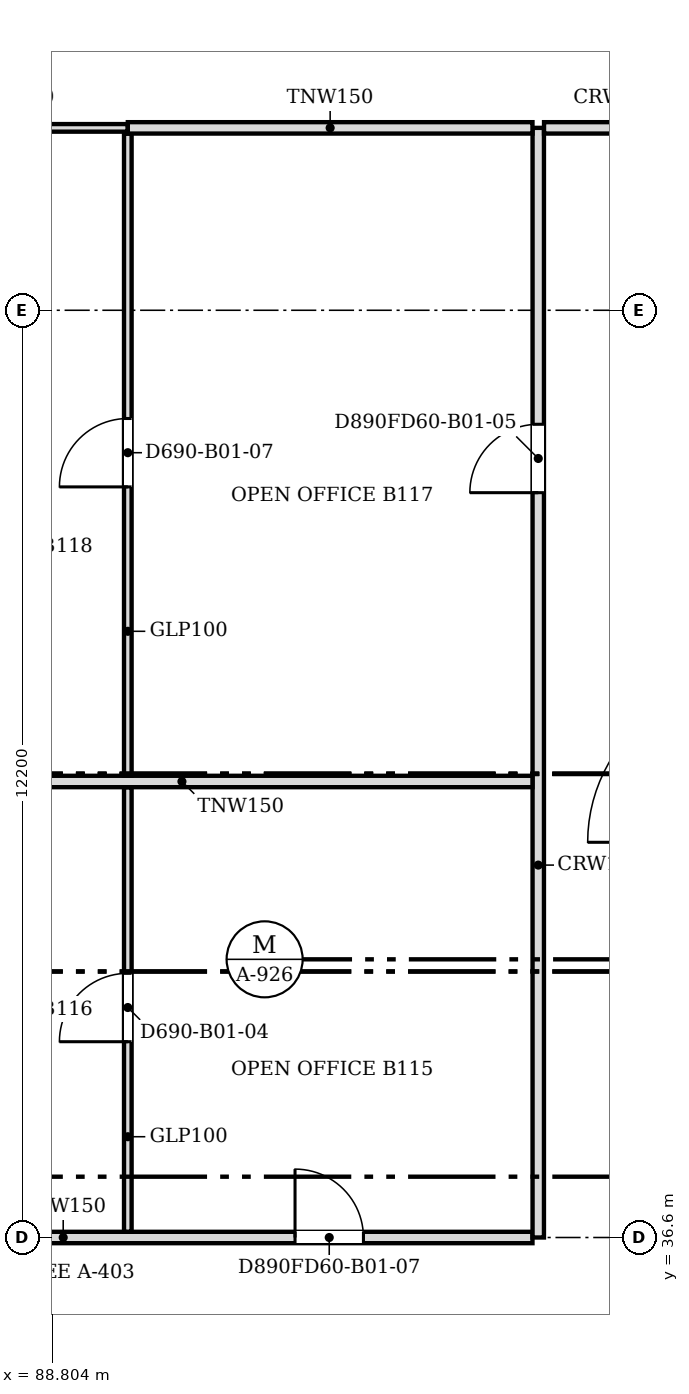
"""IFC4 building model, lengths in metres.
Left out: names, types, materials, properties, quantities, classifications, styles, units other than length and angle.
Written with IfcOpenShell. Run it as: python <this file> out.ifc"""

import sys

from ifc_helpers import new_model, si_unit, direction, frame, frame_2d, origin, place, context, subcontext, project, spatial, polyline, rectangle, outline, extrude, faceted_brep, source, transform, mapped, element, fill, save


model = new_model("IFC4")
c1 = context("Model", 3, precision=1e-05, world=origin(), true_north=direction((0.0, 1.0)))
c2 = subcontext(c1, "Body", "Model", "MODEL_VIEW")
j1 = project(units=[si_unit("LENGTHUNIT", "METRE"), si_unit("PLANEANGLEUNIT", "RADIAN")], contexts=[c1])
p1 = place(None, origin())
s1 = spatial("IfcSite", under=j1, at=p1, CompositionType="ELEMENT")
p2 = place(p1, origin())
s2 = spatial("IfcBuilding", under=s1, at=p2, CompositionType="ELEMENT")
p3 = place(p2, frame((0.0, 0.0, 16.8)))
s3 = spatial("IfcBuildingStorey", under=s2, at=p3, CompositionType="ELEMENT", Elevation=16.8)
m1 = source(origin(), c2, "Body", "Brep", [
    faceted_brep([(2.997, -0.25, 4.419), (2.944, -0.25, 4.5), (0.0, -0.25, 0.0), (2.997, -0.25, 0.0), (0.053, 0.25, 0.081), (2.891, 0.25, 4.419), (2.891, 0.25, 0.0), (0.053, 0.25, 0.0), (2.944, 0.0, 4.5), (0.0, 0.0, 0.0)], [[[0, 1, 2, 3]], [[4, 5, 6, 7]], [[8, 1, 0]], [[5, 4, 9, 2, 1, 8]], [[7, 6, 3, 2, 9]], [[7, 9, 4]], [[3, 6, 5, 8, 0]]]),
])
p4 = place(p3, frame((88.794, 53.588, 0.0), z_axis=(0.0, 0.0, 1.0), x_axis=(-0.707066050402, -0.707147509625, 0.0)))
e1 = element("IfcWall", 1, at=p4, inside=s3, PredefinedType="SOLIDWALL", context=c2, shape_type="MappedRepresentation", body=[
    mapped(m1, transform((0.0, 0.0, 0.0), scale=1.0)),
])
m2 = source(origin(), c2, "Body", "SweptSolid", [
    extrude(outline(polyline([(2.744, 3.738), (0.462, 0.25), (2.744, 0.25), (2.744, 3.738)])), frame((0.0, 0.26, 0.0), z_axis=(0.0, -1.0, 0.0), x_axis=(1.0, 0.0, 0.0)), (0.0, 0.0, 1.0), 0.52),
])
p5 = place(p4, origin())
e2 = element("IfcOpeningElement", 2, at=p5, cuts=e1, PredefinedType="OPENING", context=c2, shape_type="MappedRepresentation", body=[
    mapped(m2, transform((0.0, 0.0, 0.0), scale=1.0)),
])
p6 = place(p2, frame((0.0, 0.0, 21.3)))
s4 = spatial("IfcBuildingStorey", under=s2, at=p6, CompositionType="ELEMENT", Elevation=21.3)
m3 = source(origin(), c2, "Body", "Brep", [
    faceted_brep([(0.053, -0.25, 0.0), (2.997, -0.25, 4.5), (0.053, -0.25, 9.0), (0.0, -0.25, 8.919), (0.0, -0.25, 0.081), (0.106, 0.25, 8.919), (2.944, 0.25, 4.581), (2.944, 0.25, 4.419), (0.106, 0.25, 0.081), (2.997, 0.0, 4.5), (0.053, 0.0, 0.0), (0.053, 0.0, 9.0)], [[[0, 1, 2, 3, 4]], [[5, 6, 7, 8]], [[8, 7, 9, 1, 0, 10]], [[6, 5, 11, 2, 1, 9]], [[3, 2, 11]], [[10, 0, 4]], [[8, 10, 4, 3, 11, 5]], [[9, 7, 6]]]),
])
p7 = place(p6, frame((88.831, 53.625, -4.5), z_axis=(0.0, 0.0, 1.0), x_axis=(-0.707147509625, -0.707066050402, 0.0)))
e3 = element("IfcWall", 3, at=p7, inside=s4, PredefinedType="SOLIDWALL", context=c2, shape_type="MappedRepresentation", body=[
    mapped(m3, transform((0.0, 0.0, 0.0), scale=1.0)),
])
m4 = source(origin(), c2, "Body", "SweptSolid", [
    extrude(outline(polyline([(0.253, 0.762), (2.698, 4.5), (0.253, 8.238), (0.253, 0.762)])), frame((0.0, 0.26, 0.0), z_axis=(0.0, -1.0, 0.0), x_axis=(1.0, 0.0, 0.0)), (0.0, 0.0, 1.0), 0.52),
])
p8 = place(p7, origin())
e4 = element("IfcOpeningElement", 4, at=p8, cuts=e3, PredefinedType="OPENING", context=c2, shape_type="MappedRepresentation", body=[
    mapped(m4, transform((0.0, 0.0, 0.0), scale=1.0)),
])
p9 = place(p3, frame((85.9, 36.6, 0.0), z_axis=(0.0, 0.0, 1.0), x_axis=(1.0, 0.0, 0.0)))
e5 = element("IfcWall", 5, at=p9, inside=s3, PredefinedType="PARTITIONING", context=c2, shape_type="SweptSolid", body=[
    extrude(rectangle(XDim=9.224, YDim=0.15, at=frame_2d((4.612, 0.0))), origin(), (0.0, 0.0, 1.0), 3.415),
])
m5 = source(origin(), c2, "Body", "SweptSolid", [
    extrude(rectangle(XDim=0.9, YDim=2.1, at=frame_2d((0.45, 1.05))), frame((0.0, 0.085, 0.0), z_axis=(0.0, -1.0, 0.0), x_axis=(1.0, 0.0, 0.0)), (0.0, 0.0, 1.0), 0.17),
])
p10 = place(p9, frame((6.1, 0.0, 0.0)))
e6 = element("IfcOpeningElement", 6, at=p10, cuts=e5, PredefinedType="OPENING", context=c2, shape_type="MappedRepresentation", body=[
    mapped(m5, transform((0.0, 0.0, 0.0), scale=1.0)),
])
p11 = place(p3, frame((95.2, 36.6, 0.0), z_axis=(0.0, 0.0, 1.0), x_axis=(0.0, 1.0, 0.0)))
e7 = element("IfcWall", 7, at=p11, inside=s3, PredefinedType="PARTITIONING", context=c2, shape_type="SweptSolid", body=[
    extrude(rectangle(XDim=14.6, YDim=0.15, at=frame_2d((7.3, 0.0))), origin(), (0.0, 0.0, 1.0), 3.415),
])
p12 = place(p11, frame((9.8, 0.0, 0.0)))
e8 = element("IfcOpeningElement", 8, at=p12, cuts=e7, PredefinedType="OPENING", context=c2, shape_type="MappedRepresentation", body=[
    mapped(m5, transform((0.0, 0.0, 0.0), scale=1.0)),
])
p13 = place(p3, frame((89.8, 36.676, 0.0), z_axis=(0.0, 0.0, 1.0), x_axis=(0.0, 1.0, 0.0)))
e9 = element("IfcWall", 9, at=p13, inside=s3, PredefinedType="PARTITIONING", context=c2, shape_type="SweptSolid", body=[
    extrude(rectangle(XDim=5.848, YDim=0.1, at=frame_2d((2.924, 0.0))), origin(), (0.0, 0.0, 1.0), 3.415),
])
m6 = source(origin(), c2, "Body", "SweptSolid", [
    extrude(rectangle(XDim=0.9, YDim=2.1, at=frame_2d((0.45, 1.05))), frame((0.0, 0.06, 0.0), z_axis=(0.0, -1.0, 0.0), x_axis=(1.0, 0.0, 0.0)), (0.0, 0.0, 1.0), 0.12),
])
p14 = place(p13, frame((2.5, 0.0, 0.0)))
e10 = element("IfcOpeningElement", 10, at=p14, cuts=e9, PredefinedType="OPENING", context=c2, shape_type="MappedRepresentation", body=[
    mapped(m6, transform((0.0, 0.0, 0.0), scale=1.0)),
])
p15 = place(p3, frame((85.9, 42.6, 0.0), z_axis=(0.0, 0.0, 1.0), x_axis=(1.0, 0.0, 0.0)))
e11 = element("IfcWall", 11, at=p15, inside=s3, PredefinedType="PARTITIONING", context=c2, shape_type="SweptSolid", body=[
    extrude(rectangle(XDim=9.224, YDim=0.15, at=frame_2d((4.612, 0.0))), origin(), (0.0, 0.0, 1.0), 3.415),
])
p16 = place(p3, frame((89.8, 42.676, 0.0), z_axis=(0.0, 0.0, 1.0), x_axis=(0.0, 1.0, 0.0)))
e12 = element("IfcWall", 12, at=p16, inside=s3, PredefinedType="PARTITIONING", context=c2, shape_type="SweptSolid", body=[
    extrude(rectangle(XDim=8.448, YDim=0.1, at=frame_2d((4.224, 0.0))), origin(), (0.0, 0.0, 1.0), 3.415),
])
p17 = place(p16, frame((3.8, 0.0, 0.0)))
e13 = element("IfcOpeningElement", 13, at=p17, cuts=e12, PredefinedType="OPENING", context=c2, shape_type="MappedRepresentation", body=[
    mapped(m6, transform((0.0, 0.0, 0.0), scale=1.0)),
])
p18 = place(p3, frame((86.862, 51.2, 0.0), z_axis=(0.0, 0.0, 1.0), x_axis=(1.0, 0.0, 0.0)))
e14 = element("IfcWall", 14, at=p18, inside=s3, PredefinedType="PARTITIONING", context=c2, shape_type="SweptSolid", body=[
    extrude(rectangle(XDim=2.937, YDim=0.1, at=frame_2d((1.469, 0.0))), origin(), (0.0, 0.0, 1.0), 3.415),
])
p19 = place(p3, frame((89.8, 51.2, 0.0), z_axis=(0.0, 0.0, 1.0), x_axis=(1.0, 0.0, 0.0)))
e15 = element("IfcWall", 15, at=p19, inside=s3, PredefinedType="PARTITIONING", context=c2, shape_type="SweptSolid", body=[
    extrude(rectangle(XDim=5.324, YDim=0.15, at=frame_2d((2.662, 0.0))), origin(), (0.0, 0.0, 1.0), 3.415),
])
p20 = place(p3, frame((95.276, 51.2, 0.0), z_axis=(0.0, 0.0, 1.0), x_axis=(1.0, 0.0, 0.0)))
e16 = element("IfcWall", 16, at=p20, inside=s3, PredefinedType="PARTITIONING", context=c2, shape_type="SweptSolid", body=[
    extrude(rectangle(XDim=4.724, YDim=0.15, at=frame_2d((2.362, 0.0))), origin(), (0.0, 0.0, 1.0), 3.415),
])
m7 = source(origin(), c2, "Body", "SweptSolid", [
    extrude(rectangle(XDim=1.0, YDim=2.1, at=frame_2d((0.5, 1.05))), frame((0.0, 0.085, 0.0), z_axis=(0.0, -1.0, 0.0), x_axis=(1.0, 0.0, 0.0)), (0.0, 0.0, 1.0), 0.17),
])
p21 = place(p20, frame((1.9, 0.0, 0.0)))
e17 = element("IfcOpeningElement", 17, at=p21, cuts=e16, PredefinedType="OPENING", context=c2, shape_type="MappedRepresentation", body=[
    mapped(m7, transform((0.0, 0.0, 0.0), scale=1.0)),
])
m8 = source(origin(), c2, "Body", "SweptSolid", [
    extrude(rectangle(XDim=0.9, YDim=2.1, at=frame_2d((0.45, 1.05))), frame((0.0, 0.025, 0.0), z_axis=(0.0, -1.0, 0.0), x_axis=(1.0, 0.0, 0.0)), (0.0, 0.0, 1.0), 0.05),
])
p22 = place(p14, origin())
e18 = element("IfcDoor", 18, at=p22, inside=s3, OperationType="SINGLE_SWING_LEFT", PredefinedType="DOOR", context=c2, shape_type="MappedRepresentation", body=[
    mapped(m8, transform((0.0, 0.0, 0.0), scale=1.0)),
])
fill(e10, e18)
p23 = place(p17, origin())
e19 = element("IfcDoor", 19, at=p23, inside=s3, OperationType="SINGLE_SWING_LEFT", PredefinedType="DOOR", context=c2, shape_type="MappedRepresentation", body=[
    mapped(m8, transform((0.0, 0.0, 0.0), scale=1.0)),
])
fill(e13, e19)
p24 = place(p12, origin())
e20 = element("IfcDoor", 20, at=p24, inside=s3, OperationType="SINGLE_SWING_LEFT", PredefinedType="DOOR", context=c2, shape_type="MappedRepresentation", body=[
    mapped(m8, transform((0.0, 0.0, 0.0), scale=1.0)),
])
fill(e8, e20)
p25 = place(p10, origin())
e21 = element("IfcDoor", 21, at=p25, inside=s3, OperationType="SINGLE_SWING_LEFT", PredefinedType="DOOR", context=c2, shape_type="MappedRepresentation", body=[
    mapped(m8, transform((0.0, 0.0, 0.0), scale=1.0)),
])
fill(e6, e21)
save(model, sys.argv[1])
